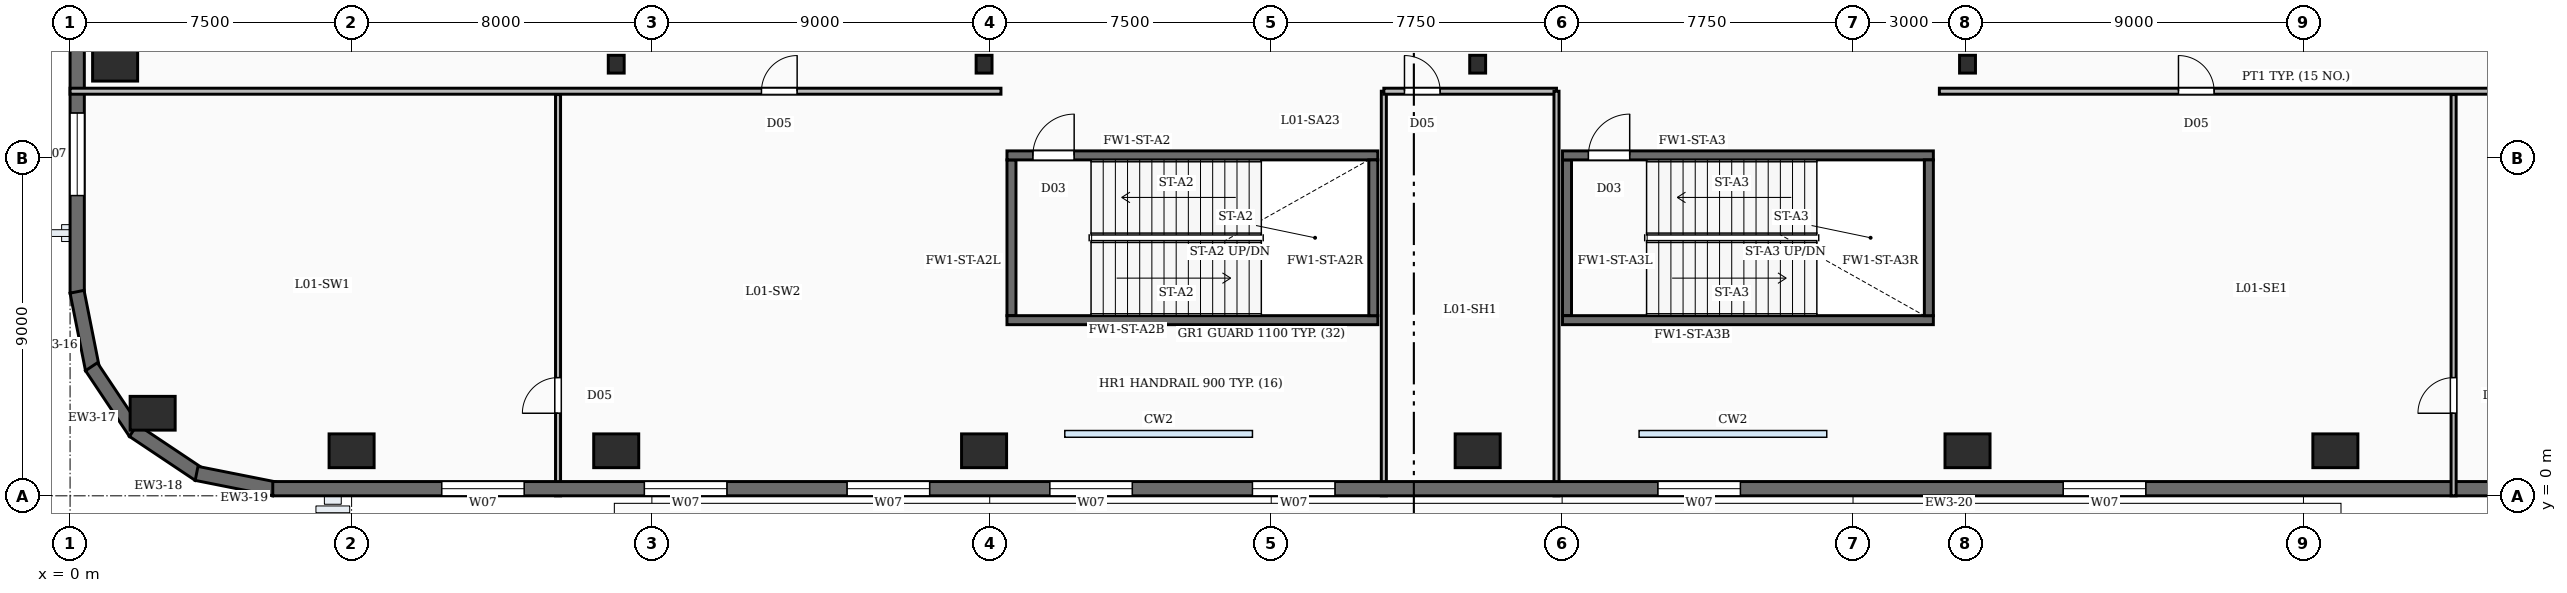
"""IFC4 building model, lengths in metres.
Left out: names, types, materials, properties, quantities, classifications, styles, units other than length and angle.
Written with IfcOpenShell. Run it as: python <this file> out.ifc"""

import sys

from ifc_helpers import new_model, si_unit, direction, frame, frame_2d, origin, origin_2d, place, context, subcontext, project, spatial, rectangle, i_section, extrude, element, fill, save


model = new_model("IFC4")
c1 = context("Model", 3, precision=1e-05, world=origin(), true_north=direction((0.0, 1.0)))
c2 = subcontext(c1, "Body", "Model", "MODEL_VIEW")
j1 = project(units=[si_unit("LENGTHUNIT", "METRE"), si_unit("PLANEANGLEUNIT", "RADIAN")], contexts=[c1])
p1 = place(None, origin())
s1 = spatial("IfcSite", under=j1, at=p1, CompositionType="ELEMENT")
p2 = place(p1, origin())
s2 = spatial("IfcBuilding", under=s1, at=p2, CompositionType="ELEMENT")
p3 = place(p2, frame((0.0, 0.0, 8.0)))
s3 = spatial("IfcBuildingStorey", under=s2, at=p3, CompositionType="ELEMENT", Elevation=8.0)
for number, where, z_axis, x_axis in (
    (1, (2.2, 2.2, -0.35), (0.0, 0.0, 1.0), (1.0, 0.0, 0.0)),
    (2, (7.5, 1.2, -0.35), (0.0, 0.0, 1.0), (1.0, 0.0, 0.0)),
    (3, (14.55, 1.2, -0.35), (0.0, 0.0, 1.0), (1.0, 0.0, 0.0)),
    (4, (24.35, 1.2, -0.35), (0.0, 0.0, 1.0), (1.0, 0.0, 0.0)),
    (5, (37.5, 1.2, -0.35), (0.0, 0.0, 1.0), (1.0, 0.0, 0.0)),
    (6, (50.55, 1.2, -0.35), (0.0, 0.0, 1.0), (1.0, 0.0, 0.0)),
    (7, (60.35, 1.2, -0.35), (0.0, 0.0, 1.0), (1.0, 0.0, 0.0)),
    (8, (1.2, 11.5, -0.35), (0.0, 0.0, 1.0), (1.0, 0.0, 0.0)),
):
    element("IfcColumn", number, at=place(p3, frame(where, z_axis=z_axis, x_axis=x_axis)), inside=s3, PredefinedType="COLUMN", context=c2, shape_type="SweptSolid", body=[
        extrude(rectangle(XDim=1.2, YDim=0.9, at=origin_2d()), origin(), (0.0, 0.0, 1.0), 5.0),
    ])
for number, where, z_axis, x_axis in (
    (9, (14.55, 11.5, -0.35), (0.0, 0.0, 1.0), (1.0, 0.0, 0.0)),
    (10, (24.35, 11.5, -0.35), (0.0, 0.0, 1.0), (1.0, 0.0, 0.0)),
    (11, (37.5, 11.5, -0.35), (0.0, 0.0, 1.0), (1.0, 0.0, 0.0)),
    (12, (50.55, 11.5, -0.35), (0.0, 0.0, 1.0), (1.0, 0.0, 0.0)),
):
    element("IfcColumn", number, at=place(p3, frame(where, z_axis=z_axis, x_axis=x_axis)), inside=s3, PredefinedType="COLUMN", context=c2, shape_type="SweptSolid", body=[
        extrude(i_section(OverallWidth=0.424, OverallDepth=0.474, WebThickness=0.048, FlangeThickness=0.077, FilletRadius=0.02, at=origin_2d()), origin(), (0.0, 0.0, 1.0), 5.0),
    ])
p4 = place(p3, frame((0.19, 5.4, 0.0), z_axis=(0.0, 0.0, 1.0), x_axis=(0.0, 1.0, 0.0)))
e13 = element("IfcWall", 13, at=p4, inside=s3, PredefinedType="SOLIDWALL", context=c2, shape_type="SweptSolid", body=[
    extrude(rectangle(XDim=43.7, YDim=0.38, at=frame_2d((21.85, 0.0))), origin(), (0.0, 0.0, 1.0), 4.65),
])
p5 = place(p4, frame((2.6, 0.0, 0.95)))
e14 = element("IfcOpeningElement", 14, at=p5, cuts=e13, PredefinedType="OPENING", context=c2, shape_type="SweptSolid", body=[
    extrude(rectangle(XDim=2.2, YDim=2.5, at=frame_2d((1.1, 1.25))), frame((0.0, 0.2, 0.0), z_axis=(0.0, -1.0, 0.0), x_axis=(1.0, 0.0, 0.0)), (0.0, 0.0, 1.0), 0.4),
])
p6 = place(p4, frame((8.0, 0.0, 0.95)))
e15 = element("IfcOpeningElement", 15, at=p6, cuts=e13, PredefinedType="OPENING", context=c2, shape_type="SweptSolid", body=[
    extrude(rectangle(XDim=2.2, YDim=2.5, at=frame_2d((1.1, 1.25))), frame((0.0, 0.2, 0.0), z_axis=(0.0, -1.0, 0.0), x_axis=(1.0, 0.0, 0.0)), (0.0, 0.0, 1.0), 0.4),
])
p7 = place(p4, frame((24.2, 0.0, 0.95)))
e16 = element("IfcOpeningElement", 16, at=p7, cuts=e13, PredefinedType="OPENING", context=c2, shape_type="SweptSolid", body=[
    extrude(rectangle(XDim=2.2, YDim=2.5, at=frame_2d((1.1, 1.25))), frame((0.0, 0.2, 0.0), z_axis=(0.0, -1.0, 0.0), x_axis=(1.0, 0.0, 0.0)), (0.0, 0.0, 1.0), 0.4),
])
p8 = place(p4, frame((29.6, 0.0, 0.95)))
e17 = element("IfcOpeningElement", 17, at=p8, cuts=e13, PredefinedType="OPENING", context=c2, shape_type="SweptSolid", body=[
    extrude(rectangle(XDim=2.2, YDim=2.5, at=frame_2d((1.1, 1.25))), frame((0.0, 0.2, 0.0), z_axis=(0.0, -1.0, 0.0), x_axis=(1.0, 0.0, 0.0)), (0.0, 0.0, 1.0), 0.4),
])
for number, where, z_axis, x_axis in (
    (18, (0.597, 3.371, 0.0), (0.0, 0.0, 1.0), (-0.195, 0.981, 0.0)),
    (19, (1.74, 1.687, 0.0), (0.0, 0.0, 1.0), (-0.556, 0.832, 0.0)),
    (20, (3.439, 0.569, 0.0), (0.0, 0.0, 1.0), (-0.832, 0.556, 0.0)),
    (21, (5.437, 0.186, 0.0), (0.0, 0.0, 1.0), (-0.981, 0.195, 0.0)),
):
    element("IfcWall", number, at=place(p3, frame(where, z_axis=z_axis, x_axis=x_axis)), inside=s3, PredefinedType="SOLIDWALL", context=c2, shape_type="SweptSolid", body=[
        extrude(rectangle(XDim=2.107, YDim=0.38, at=frame_2d((1.053, 0.0))), origin(), (0.0, 0.0, 1.0), 4.65),
    ])
p9 = place(p3, frame((74.1, 0.19, 0.0), z_axis=(0.0, 0.0, 1.0), x_axis=(-1.0, 0.0, 0.0)))
e22 = element("IfcWall", 22, at=p9, inside=s3, PredefinedType="SOLIDWALL", context=c2, shape_type="SweptSolid", body=[
    extrude(rectangle(XDim=68.7, YDim=0.38, at=frame_2d((34.35, 0.0))), origin(), (0.0, 0.0, 1.0), 4.65),
])
p10 = place(p9, frame((2.6, 0.0, 0.95)))
e23 = element("IfcOpeningElement", 23, at=p10, cuts=e22, PredefinedType="OPENING", context=c2, shape_type="SweptSolid", body=[
    extrude(rectangle(XDim=2.2, YDim=2.5, at=frame_2d((1.1, 1.25))), frame((0.0, 0.2, 0.0), z_axis=(0.0, -1.0, 0.0), x_axis=(1.0, 0.0, 0.0)), (0.0, 0.0, 1.0), 0.4),
])
p11 = place(p9, frame((18.8, 0.0, 0.95)))
e24 = element("IfcOpeningElement", 24, at=p11, cuts=e22, PredefinedType="OPENING", context=c2, shape_type="SweptSolid", body=[
    extrude(rectangle(XDim=2.2, YDim=2.5, at=frame_2d((1.1, 1.25))), frame((0.0, 0.2, 0.0), z_axis=(0.0, -1.0, 0.0), x_axis=(1.0, 0.0, 0.0)), (0.0, 0.0, 1.0), 0.4),
])
p12 = place(p9, frame((29.6, 0.0, 0.95)))
e25 = element("IfcOpeningElement", 25, at=p12, cuts=e22, PredefinedType="OPENING", context=c2, shape_type="SweptSolid", body=[
    extrude(rectangle(XDim=2.2, YDim=2.5, at=frame_2d((1.1, 1.25))), frame((0.0, 0.2, 0.0), z_axis=(0.0, -1.0, 0.0), x_axis=(1.0, 0.0, 0.0)), (0.0, 0.0, 1.0), 0.4),
])
p13 = place(p9, frame((40.4, 0.0, 0.95)))
e26 = element("IfcOpeningElement", 26, at=p13, cuts=e22, PredefinedType="OPENING", context=c2, shape_type="SweptSolid", body=[
    extrude(rectangle(XDim=2.2, YDim=2.5, at=frame_2d((1.1, 1.25))), frame((0.0, 0.2, 0.0), z_axis=(0.0, -1.0, 0.0), x_axis=(1.0, 0.0, 0.0)), (0.0, 0.0, 1.0), 0.4),
])
p14 = place(p9, frame((45.8, 0.0, 0.95)))
e27 = element("IfcOpeningElement", 27, at=p14, cuts=e22, PredefinedType="OPENING", context=c2, shape_type="SweptSolid", body=[
    extrude(rectangle(XDim=2.2, YDim=2.5, at=frame_2d((1.1, 1.25))), frame((0.0, 0.2, 0.0), z_axis=(0.0, -1.0, 0.0), x_axis=(1.0, 0.0, 0.0)), (0.0, 0.0, 1.0), 0.4),
])
p15 = place(p9, frame((51.2, 0.0, 0.95)))
e28 = element("IfcOpeningElement", 28, at=p15, cuts=e22, PredefinedType="OPENING", context=c2, shape_type="SweptSolid", body=[
    extrude(rectangle(XDim=2.2, YDim=2.5, at=frame_2d((1.1, 1.25))), frame((0.0, 0.2, 0.0), z_axis=(0.0, -1.0, 0.0), x_axis=(1.0, 0.0, 0.0)), (0.0, 0.0, 1.0), 0.4),
])
p16 = place(p9, frame((56.6, 0.0, 0.95)))
e29 = element("IfcOpeningElement", 29, at=p16, cuts=e22, PredefinedType="OPENING", context=c2, shape_type="SweptSolid", body=[
    extrude(rectangle(XDim=2.2, YDim=2.5, at=frame_2d((1.1, 1.25))), frame((0.0, 0.2, 0.0), z_axis=(0.0, -1.0, 0.0), x_axis=(1.0, 0.0, 0.0)), (0.0, 0.0, 1.0), 0.4),
])
p17 = place(p9, frame((62.0, 0.0, 0.95)))
e30 = element("IfcOpeningElement", 30, at=p17, cuts=e22, PredefinedType="OPENING", context=c2, shape_type="SweptSolid", body=[
    extrude(rectangle(XDim=2.2, YDim=2.5, at=frame_2d((1.1, 1.25))), frame((0.0, 0.2, 0.0), z_axis=(0.0, -1.0, 0.0), x_axis=(1.0, 0.0, 0.0)), (0.0, 0.0, 1.0), 0.4),
])
p18 = place(p3, frame((24.96, 9.07, 0.0), z_axis=(0.0, 0.0, 1.0), x_axis=(1.0, 0.0, 0.0)))
e31 = element("IfcWall", 31, at=p18, inside=s3, PredefinedType="SOLIDWALL", context=c2, shape_type="SweptSolid", body=[
    extrude(rectangle(XDim=9.88, YDim=0.24, at=frame_2d((4.94, 0.0))), origin(), (0.0, 0.0, 1.0), 4.65),
])
p19 = place(p18, frame((0.69, 0.0, 0.0)))
e32 = element("IfcOpeningElement", 32, at=p19, cuts=e31, PredefinedType="OPENING", context=c2, shape_type="SweptSolid", body=[
    extrude(rectangle(XDim=1.1, YDim=2.15, at=frame_2d((0.55, 1.075))), frame((0.0, 0.13, 0.0), z_axis=(0.0, -1.0, 0.0), x_axis=(1.0, 0.0, 0.0)), (0.0, 0.0, 1.0), 0.26),
])
p20 = place(p3, frame((24.96, 4.68, 0.0), z_axis=(0.0, 0.0, 1.0), x_axis=(1.0, 0.0, 0.0)))
e33 = element("IfcWall", 33, at=p20, inside=s3, PredefinedType="SOLIDWALL", context=c2, shape_type="SweptSolid", body=[
    extrude(rectangle(XDim=9.88, YDim=0.24, at=frame_2d((4.94, 0.0))), origin(), (0.0, 0.0, 1.0), 4.65),
])
for number, where, z_axis, x_axis in (
    (34, (25.08, 4.8, 0.0), (0.0, 0.0, 1.0), (0.0, 1.0, 0.0)),
    (35, (34.72, 4.8, 0.0), (0.0, 0.0, 1.0), (0.0, 1.0, 0.0)),
):
    element("IfcWall", number, at=place(p3, frame(where, z_axis=z_axis, x_axis=x_axis)), inside=s3, PredefinedType="SOLIDWALL", context=c2, shape_type="SweptSolid", body=[
        extrude(rectangle(XDim=4.15, YDim=0.24, at=frame_2d((2.075, 0.0))), origin(), (0.0, 0.0, 1.0), 4.65),
    ])
p21 = place(p3, frame((39.76, 9.07, 0.0), z_axis=(0.0, 0.0, 1.0), x_axis=(1.0, 0.0, 0.0)))
e36 = element("IfcWall", 36, at=p21, inside=s3, PredefinedType="SOLIDWALL", context=c2, shape_type="SweptSolid", body=[
    extrude(rectangle(XDim=9.88, YDim=0.24, at=frame_2d((4.94, 0.0))), origin(), (0.0, 0.0, 1.0), 4.65),
])
p22 = place(p21, frame((0.69, 0.0, 0.0)))
e37 = element("IfcOpeningElement", 37, at=p22, cuts=e36, PredefinedType="OPENING", context=c2, shape_type="SweptSolid", body=[
    extrude(rectangle(XDim=1.1, YDim=2.15, at=frame_2d((0.55, 1.075))), frame((0.0, 0.13, 0.0), z_axis=(0.0, -1.0, 0.0), x_axis=(1.0, 0.0, 0.0)), (0.0, 0.0, 1.0), 0.26),
])
p23 = place(p3, frame((39.76, 4.68, 0.0), z_axis=(0.0, 0.0, 1.0), x_axis=(1.0, 0.0, 0.0)))
e38 = element("IfcWall", 38, at=p23, inside=s3, PredefinedType="SOLIDWALL", context=c2, shape_type="SweptSolid", body=[
    extrude(rectangle(XDim=9.88, YDim=0.24, at=frame_2d((4.94, 0.0))), origin(), (0.0, 0.0, 1.0), 4.65),
])
for number, where, z_axis, x_axis in (
    (39, (39.88, 4.8, 0.0), (0.0, 0.0, 1.0), (0.0, 1.0, 0.0)),
    (40, (49.52, 4.8, 0.0), (0.0, 0.0, 1.0), (0.0, 1.0, 0.0)),
):
    element("IfcWall", number, at=place(p3, frame(where, z_axis=z_axis, x_axis=x_axis)), inside=s3, PredefinedType="SOLIDWALL", context=c2, shape_type="SweptSolid", body=[
        extrude(rectangle(XDim=4.15, YDim=0.24, at=frame_2d((2.075, 0.0))), origin(), (0.0, 0.0, 1.0), 4.65),
    ])
p24 = place(p3, frame((13.0, 0.0, 0.0), z_axis=(0.0, 0.0, 1.0), x_axis=(0.0, 1.0, 0.0)))
e41 = element("IfcWall", 41, at=p24, inside=s3, PredefinedType="PARTITIONING", context=c2, shape_type="SweptSolid", body=[
    extrude(rectangle(XDim=10.69, YDim=0.135, at=frame_2d((5.345, 0.0))), origin(), (0.0, 0.0, 1.0), 3.71),
])
p25 = place(p24, frame((2.2, 0.0, 0.0)))
e42 = element("IfcOpeningElement", 42, at=p25, cuts=e41, PredefinedType="OPENING", context=c2, shape_type="SweptSolid", body=[
    extrude(rectangle(XDim=0.95, YDim=2.15, at=frame_2d((0.475, 1.075))), frame((0.0, 0.077, 0.0), z_axis=(0.0, -1.0, 0.0), x_axis=(1.0, 0.0, 0.0)), (0.0, 0.0, 1.0), 0.155),
])
p26 = place(p3, frame((0.0, 10.78, 0.0), z_axis=(0.0, 0.0, 1.0), x_axis=(1.0, 0.0, 0.0)))
e43 = element("IfcWall", 43, at=p26, inside=s3, PredefinedType="PARTITIONING", context=c2, shape_type="SweptSolid", body=[
    extrude(rectangle(XDim=24.8, YDim=0.16, at=frame_2d((12.4, 0.0))), origin(), (0.0, 0.0, 1.0), 3.71),
])
p27 = place(p26, frame((18.42, 0.0, 0.0)))
e44 = element("IfcOpeningElement", 44, at=p27, cuts=e43, PredefinedType="OPENING", context=c2, shape_type="SweptSolid", body=[
    extrude(rectangle(XDim=0.95, YDim=2.15, at=frame_2d((0.475, 1.075))), frame((0.0, 0.09, 0.0), z_axis=(0.0, -1.0, 0.0), x_axis=(1.0, 0.0, 0.0)), (0.0, 0.0, 1.0), 0.18),
])
p28 = place(p3, frame((63.5, 0.0, 0.0), z_axis=(0.0, 0.0, 1.0), x_axis=(0.0, 1.0, 0.0)))
e45 = element("IfcWall", 45, at=p28, inside=s3, PredefinedType="PARTITIONING", context=c2, shape_type="SweptSolid", body=[
    extrude(rectangle(XDim=10.69, YDim=0.135, at=frame_2d((5.345, 0.0))), origin(), (0.0, 0.0, 1.0), 3.71),
])
p29 = place(p28, frame((2.2, 0.0, 0.0)))
e46 = element("IfcOpeningElement", 46, at=p29, cuts=e45, PredefinedType="OPENING", context=c2, shape_type="SweptSolid", body=[
    extrude(rectangle(XDim=0.95, YDim=2.15, at=frame_2d((0.475, 1.075))), frame((0.0, 0.077, 0.0), z_axis=(0.0, -1.0, 0.0), x_axis=(1.0, 0.0, 0.0)), (0.0, 0.0, 1.0), 0.155),
])
p30 = place(p3, frame((49.8, 10.78, 0.0), z_axis=(0.0, 0.0, 1.0), x_axis=(1.0, 0.0, 0.0)))
e47 = element("IfcWall", 47, at=p30, inside=s3, PredefinedType="PARTITIONING", context=c2, shape_type="SweptSolid", body=[
    extrude(rectangle(XDim=29.7, YDim=0.16, at=frame_2d((14.85, 0.0))), origin(), (0.0, 0.0, 1.0), 3.71),
])
p31 = place(p30, frame((6.37, 0.0, 0.0)))
e48 = element("IfcOpeningElement", 48, at=p31, cuts=e47, PredefinedType="OPENING", context=c2, shape_type="SweptSolid", body=[
    extrude(rectangle(XDim=0.95, YDim=2.15, at=frame_2d((0.475, 1.075))), frame((0.0, 0.09, 0.0), z_axis=(0.0, -1.0, 0.0), x_axis=(1.0, 0.0, 0.0)), (0.0, 0.0, 1.0), 0.18),
])
p32 = place(p30, frame((18.02, 0.0, 0.0)))
e49 = element("IfcOpeningElement", 49, at=p32, cuts=e47, PredefinedType="OPENING", context=c2, shape_type="SweptSolid", body=[
    extrude(rectangle(XDim=0.95, YDim=2.15, at=frame_2d((0.475, 1.075))), frame((0.0, 0.09, 0.0), z_axis=(0.0, -1.0, 0.0), x_axis=(1.0, 0.0, 0.0)), (0.0, 0.0, 1.0), 0.18),
])
p33 = place(p3, frame((35.0, 10.78, 0.0), z_axis=(0.0, 0.0, 1.0), x_axis=(1.0, 0.0, 0.0)))
e50 = element("IfcWall", 50, at=p33, inside=s3, PredefinedType="PARTITIONING", context=c2, shape_type="SweptSolid", body=[
    extrude(rectangle(XDim=4.6, YDim=0.16, at=frame_2d((2.3, 0.0))), origin(), (0.0, 0.0, 1.0), 3.71),
])
p34 = place(p33, frame((0.55, 0.0, 0.0)))
e51 = element("IfcOpeningElement", 51, at=p34, cuts=e50, PredefinedType="OPENING", context=c2, shape_type="SweptSolid", body=[
    extrude(rectangle(XDim=0.95, YDim=2.15, at=frame_2d((0.475, 1.075))), frame((0.0, 0.09, 0.0), z_axis=(0.0, -1.0, 0.0), x_axis=(1.0, 0.0, 0.0)), (0.0, 0.0, 1.0), 0.18),
])
for number, where, z_axis, x_axis in (
    (52, (35.0, 0.0, 0.0), (0.0, 0.0, 1.0), (0.0, 1.0, 0.0)),
    (53, (39.6, 0.0, 0.0), (0.0, 0.0, 1.0), (0.0, 1.0, 0.0)),
):
    element("IfcWall", number, at=place(p3, frame(where, z_axis=z_axis, x_axis=x_axis)), inside=s3, PredefinedType="PARTITIONING", context=c2, shape_type="SweptSolid", body=[
        extrude(rectangle(XDim=10.78, YDim=0.135, at=frame_2d((5.39, 0.0))), origin(), (0.0, 0.0, 1.0), 3.71),
    ])
p35 = place(p5, origin())
e54 = element("IfcWindow", 54, at=p35, inside=s3, PartitioningType="DOUBLE_PANEL_VERTICAL", PredefinedType="WINDOW", context=c2, shape_type="SweptSolid", body=[
    extrude(rectangle(XDim=2.2, YDim=2.5, at=frame_2d((1.1, 1.25))), frame((0.0, 0.03, 0.0), z_axis=(0.0, -1.0, 0.0), x_axis=(1.0, 0.0, 0.0)), (0.0, 0.0, 1.0), 0.06),
])
fill(e14, e54)
p36 = place(p11, origin())
e55 = element("IfcWindow", 55, at=p36, inside=s3, PartitioningType="DOUBLE_PANEL_VERTICAL", PredefinedType="WINDOW", context=c2, shape_type="SweptSolid", body=[
    extrude(rectangle(XDim=2.2, YDim=2.5, at=frame_2d((1.1, 1.25))), frame((0.0, 0.03, 0.0), z_axis=(0.0, -1.0, 0.0), x_axis=(1.0, 0.0, 0.0)), (0.0, 0.0, 1.0), 0.06),
])
fill(e24, e55)
p37 = place(p12, origin())
e56 = element("IfcWindow", 56, at=p37, inside=s3, PartitioningType="DOUBLE_PANEL_VERTICAL", PredefinedType="WINDOW", context=c2, shape_type="SweptSolid", body=[
    extrude(rectangle(XDim=2.2, YDim=2.5, at=frame_2d((1.1, 1.25))), frame((0.0, 0.03, 0.0), z_axis=(0.0, -1.0, 0.0), x_axis=(1.0, 0.0, 0.0)), (0.0, 0.0, 1.0), 0.06),
])
fill(e25, e56)
p38 = place(p13, origin())
e57 = element("IfcWindow", 57, at=p38, inside=s3, PartitioningType="DOUBLE_PANEL_VERTICAL", PredefinedType="WINDOW", context=c2, shape_type="SweptSolid", body=[
    extrude(rectangle(XDim=2.2, YDim=2.5, at=frame_2d((1.1, 1.25))), frame((0.0, 0.03, 0.0), z_axis=(0.0, -1.0, 0.0), x_axis=(1.0, 0.0, 0.0)), (0.0, 0.0, 1.0), 0.06),
])
fill(e26, e57)
p39 = place(p14, origin())
e58 = element("IfcWindow", 58, at=p39, inside=s3, PartitioningType="DOUBLE_PANEL_VERTICAL", PredefinedType="WINDOW", context=c2, shape_type="SweptSolid", body=[
    extrude(rectangle(XDim=2.2, YDim=2.5, at=frame_2d((1.1, 1.25))), frame((0.0, 0.03, 0.0), z_axis=(0.0, -1.0, 0.0), x_axis=(1.0, 0.0, 0.0)), (0.0, 0.0, 1.0), 0.06),
])
fill(e27, e58)
p40 = place(p15, origin())
e59 = element("IfcWindow", 59, at=p40, inside=s3, PartitioningType="DOUBLE_PANEL_VERTICAL", PredefinedType="WINDOW", context=c2, shape_type="SweptSolid", body=[
    extrude(rectangle(XDim=2.2, YDim=2.5, at=frame_2d((1.1, 1.25))), frame((0.0, 0.03, 0.0), z_axis=(0.0, -1.0, 0.0), x_axis=(1.0, 0.0, 0.0)), (0.0, 0.0, 1.0), 0.06),
])
fill(e28, e59)
p41 = place(p16, origin())
e60 = element("IfcWindow", 60, at=p41, inside=s3, PartitioningType="DOUBLE_PANEL_VERTICAL", PredefinedType="WINDOW", context=c2, shape_type="SweptSolid", body=[
    extrude(rectangle(XDim=2.2, YDim=2.5, at=frame_2d((1.1, 1.25))), frame((0.0, 0.03, 0.0), z_axis=(0.0, -1.0, 0.0), x_axis=(1.0, 0.0, 0.0)), (0.0, 0.0, 1.0), 0.06),
])
fill(e29, e60)
p42 = place(p17, origin())
e61 = element("IfcWindow", 61, at=p42, inside=s3, PartitioningType="DOUBLE_PANEL_VERTICAL", PredefinedType="WINDOW", context=c2, shape_type="SweptSolid", body=[
    extrude(rectangle(XDim=2.2, YDim=2.5, at=frame_2d((1.1, 1.25))), frame((0.0, 0.03, 0.0), z_axis=(0.0, -1.0, 0.0), x_axis=(1.0, 0.0, 0.0)), (0.0, 0.0, 1.0), 0.06),
])
fill(e30, e61)
p43 = place(p19, origin())
e62 = element("IfcDoor", 62, at=p43, inside=s3, OperationType="SINGLE_SWING_RIGHT", PredefinedType="DOOR", context=c2, shape_type="SweptSolid", body=[
    extrude(rectangle(XDim=1.1, YDim=2.15, at=frame_2d((0.55, 1.075))), frame((0.0, 0.025, 0.0), z_axis=(0.0, -1.0, 0.0), x_axis=(1.0, 0.0, 0.0)), (0.0, 0.0, 1.0), 0.05),
])
fill(e32, e62)
p44 = place(p22, origin())
e63 = element("IfcDoor", 63, at=p44, inside=s3, OperationType="SINGLE_SWING_RIGHT", PredefinedType="DOOR", context=c2, shape_type="SweptSolid", body=[
    extrude(rectangle(XDim=1.1, YDim=2.15, at=frame_2d((0.55, 1.075))), frame((0.0, 0.025, 0.0), z_axis=(0.0, -1.0, 0.0), x_axis=(1.0, 0.0, 0.0)), (0.0, 0.0, 1.0), 0.05),
])
fill(e37, e63)
p45 = place(p25, origin())
e64 = element("IfcDoor", 64, at=p45, inside=s3, OperationType="SINGLE_SWING_LEFT", PredefinedType="DOOR", context=c2, shape_type="SweptSolid", body=[
    extrude(rectangle(XDim=0.95, YDim=2.15, at=frame_2d((0.475, 1.075))), frame((0.0, 0.025, 0.0), z_axis=(0.0, -1.0, 0.0), x_axis=(1.0, 0.0, 0.0)), (0.0, 0.0, 1.0), 0.05),
])
fill(e42, e64)
p46 = place(p27, origin())
e65 = element("IfcDoor", 65, at=p46, inside=s3, OperationType="SINGLE_SWING_RIGHT", PredefinedType="DOOR", context=c2, shape_type="SweptSolid", body=[
    extrude(rectangle(XDim=0.95, YDim=2.15, at=frame_2d((0.475, 1.075))), frame((0.0, 0.025, 0.0), z_axis=(0.0, -1.0, 0.0), x_axis=(1.0, 0.0, 0.0)), (0.0, 0.0, 1.0), 0.05),
])
fill(e44, e65)
p47 = place(p29, origin())
e66 = element("IfcDoor", 66, at=p47, inside=s3, OperationType="SINGLE_SWING_LEFT", PredefinedType="DOOR", context=c2, shape_type="SweptSolid", body=[
    extrude(rectangle(XDim=0.95, YDim=2.15, at=frame_2d((0.475, 1.075))), frame((0.0, 0.025, 0.0), z_axis=(0.0, -1.0, 0.0), x_axis=(1.0, 0.0, 0.0)), (0.0, 0.0, 1.0), 0.05),
])
fill(e46, e66)
p48 = place(p31, origin())
e67 = element("IfcDoor", 67, at=p48, inside=s3, OperationType="SINGLE_SWING_LEFT", PredefinedType="DOOR", context=c2, shape_type="SweptSolid", body=[
    extrude(rectangle(XDim=0.95, YDim=2.15, at=frame_2d((0.475, 1.075))), frame((0.0, 0.025, 0.0), z_axis=(0.0, -1.0, 0.0), x_axis=(1.0, 0.0, 0.0)), (0.0, 0.0, 1.0), 0.05),
])
fill(e48, e67)
p49 = place(p34, origin())
e68 = element("IfcDoor", 68, at=p49, inside=s3, OperationType="SINGLE_SWING_LEFT", PredefinedType="DOOR", context=c2, shape_type="SweptSolid", body=[
    extrude(rectangle(XDim=0.95, YDim=2.15, at=frame_2d((0.475, 1.075))), frame((0.0, 0.025, 0.0), z_axis=(0.0, -1.0, 0.0), x_axis=(1.0, 0.0, 0.0)), (0.0, 0.0, 1.0), 0.05),
])
fill(e51, e68)
save(model, sys.argv[1])
